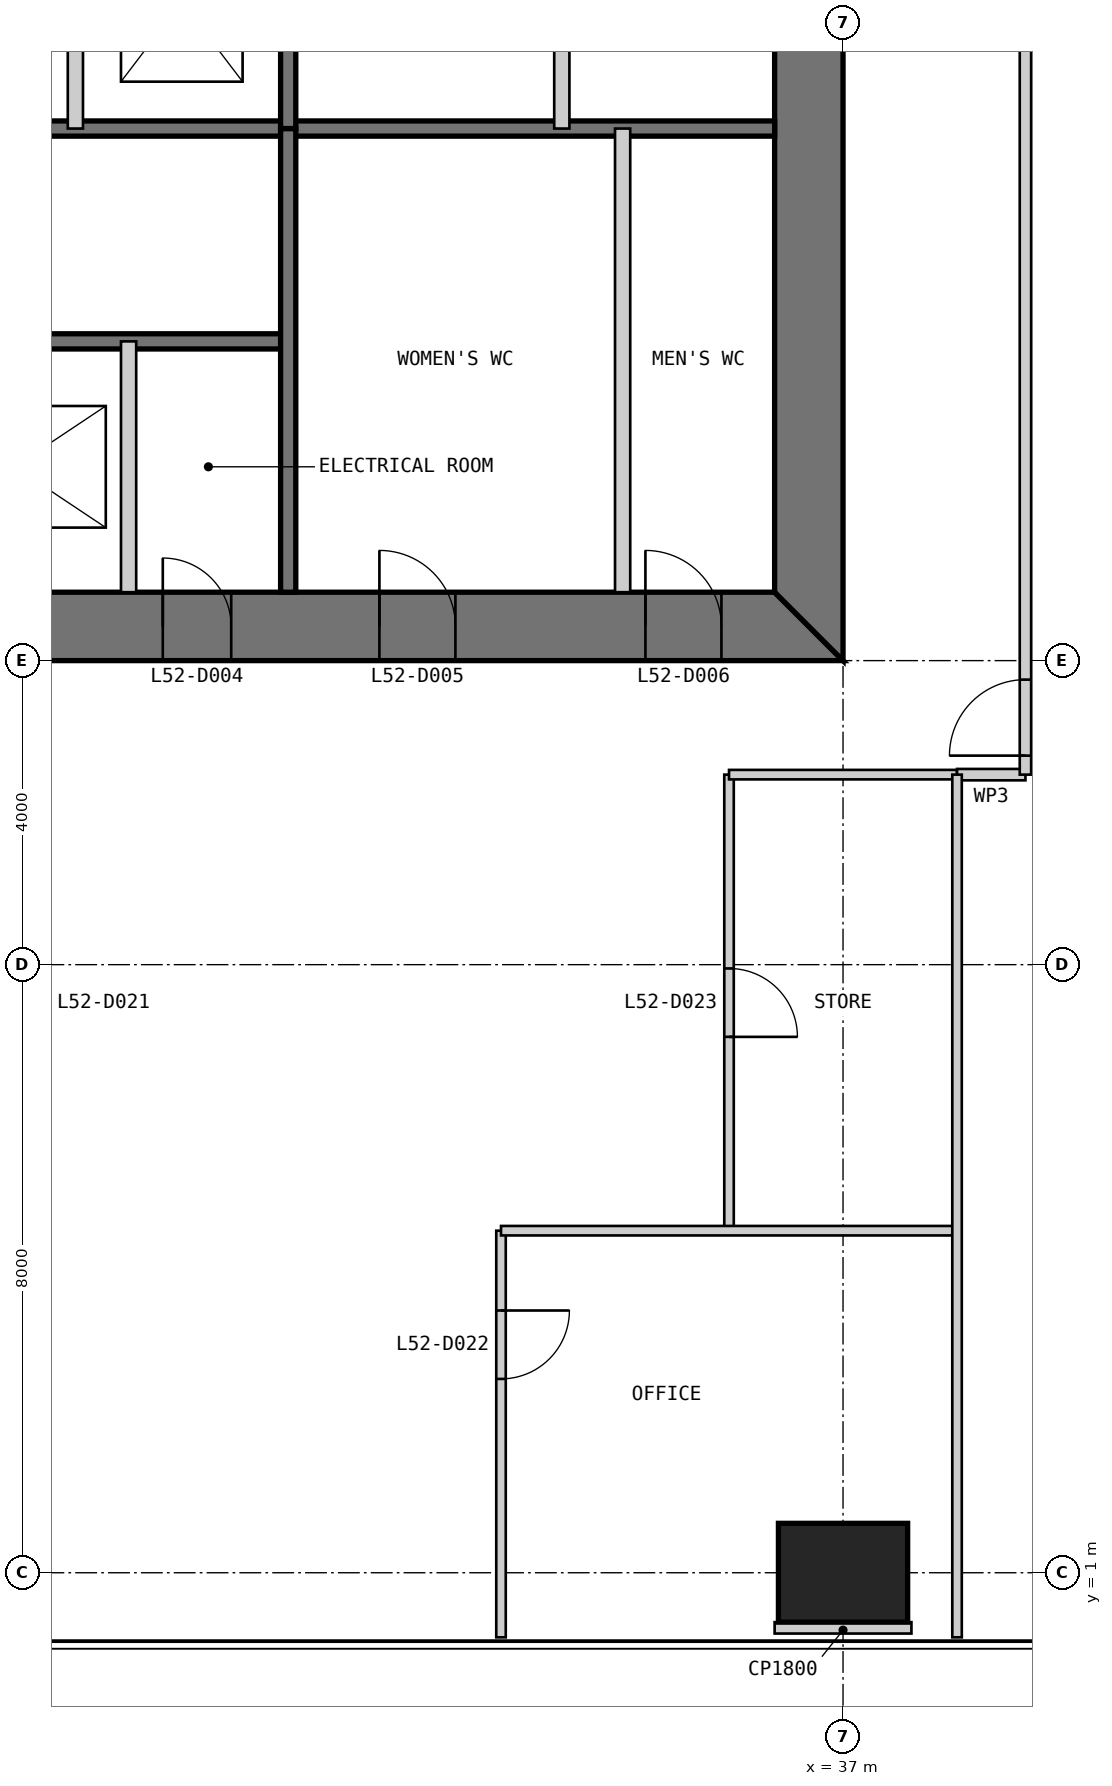
"""IFC4 building model, lengths in metres.
Left out: names, types, materials, properties, quantities, classifications, styles, units other than length and angle.
Written with IfcOpenShell. Run it as: python <this file> out.ifc"""

import sys

from ifc_helpers import new_model, si_unit, direction, frame, frame_2d, origin, origin_2d, place, context, subcontext, project, spatial, polyline, rectangle, outline, extrude, element, fill, save


model = new_model("IFC4")
c1 = context("Model", 3, precision=1e-05, world=origin(), true_north=direction((0.0, 1.0)))
c2 = subcontext(c1, "Body", "Model", "MODEL_VIEW")
j1 = project(units=[si_unit("LENGTHUNIT", "METRE"), si_unit("PLANEANGLEUNIT", "RADIAN")], contexts=[c1])
p1 = place(None, origin())
s1 = spatial("IfcSite", under=j1, at=p1, CompositionType="ELEMENT")
p2 = place(p1, origin())
s2 = spatial("IfcBuilding", under=s1, at=p2, CompositionType="ELEMENT")
p3 = place(p2, frame((0.0, 0.0, 221.8)))
s3 = spatial("IfcBuildingStorey", under=s2, at=p3, CompositionType="ELEMENT", Elevation=221.8)
p4 = place(p3, frame((37.0, 1.0, 0.0), z_axis=(0.0, 0.0, 1.0), x_axis=(1.0, 0.0, 0.0)))
e1 = element("IfcColumn", 1, at=p4, inside=s3, PredefinedType="COLUMN", context=c2, shape_type="SweptSolid", body=[
    extrude(rectangle(XDim=1.7, YDim=1.3, at=origin_2d()), origin(), (0.0, 0.0, 1.0), 4.0),
])
p5 = place(p3, frame((13.0, 13.45, 0.0), z_axis=(0.0, 0.0, 1.0), x_axis=(1.0, 0.0, 0.0)))
e2 = element("IfcWall", 2, at=p5, inside=s3, PredefinedType="SHEAR", context=c2, shape_type="SweptSolid", body=[
    extrude(outline(polyline([(0.0, -0.45), (24.0, -0.45), (23.1, 0.45), (0.9, 0.45), (0.0, -0.45)])), origin(), (0.0, 0.0, 1.0), 4.0),
])
p6 = place(p5, frame((4.9, 0.0, 0.0)))
e3 = element("IfcOpeningElement", 3, at=p6, cuts=e2, PredefinedType="OPENING", context=c2, shape_type="SweptSolid", body=[
    extrude(rectangle(XDim=1.0, YDim=2.2, at=frame_2d((0.5, 1.1))), frame((0.0, 0.46, 0.0), z_axis=(0.0, -1.0, 0.0), x_axis=(1.0, 0.0, 0.0)), (0.0, 0.0, 1.0), 0.92),
])
p7 = place(p5, frame((8.9, 0.0, 0.0)))
e4 = element("IfcOpeningElement", 4, at=p7, cuts=e2, PredefinedType="OPENING", context=c2, shape_type="SweptSolid", body=[
    extrude(rectangle(XDim=1.1, YDim=2.2, at=frame_2d((0.55, 1.1))), frame((0.0, 0.46, 0.0), z_axis=(0.0, -1.0, 0.0), x_axis=(1.0, 0.0, 0.0)), (0.0, 0.0, 1.0), 0.92),
])
p8 = place(p5, frame((15.05, 0.0, 0.0)))
e5 = element("IfcOpeningElement", 5, at=p8, cuts=e2, PredefinedType="OPENING", context=c2, shape_type="SweptSolid", body=[
    extrude(rectangle(XDim=0.9, YDim=2.2, at=frame_2d((0.45, 1.1))), frame((0.0, 0.46, 0.0), z_axis=(0.0, -1.0, 0.0), x_axis=(1.0, 0.0, 0.0)), (0.0, 0.0, 1.0), 0.92),
])
p9 = place(p5, frame((17.9, 0.0, 0.0)))
e6 = element("IfcOpeningElement", 6, at=p9, cuts=e2, PredefinedType="OPENING", context=c2, shape_type="SweptSolid", body=[
    extrude(rectangle(XDim=1.0, YDim=2.2, at=frame_2d((0.5, 1.1))), frame((0.0, 0.46, 0.0), z_axis=(0.0, -1.0, 0.0), x_axis=(1.0, 0.0, 0.0)), (0.0, 0.0, 1.0), 0.92),
])
p10 = place(p5, frame((21.4, 0.0, 0.0)))
e7 = element("IfcOpeningElement", 7, at=p10, cuts=e2, PredefinedType="OPENING", context=c2, shape_type="SweptSolid", body=[
    extrude(rectangle(XDim=1.0, YDim=2.2, at=frame_2d((0.5, 1.1))), frame((0.0, 0.46, 0.0), z_axis=(0.0, -1.0, 0.0), x_axis=(1.0, 0.0, 0.0)), (0.0, 0.0, 1.0), 0.92),
])
p11 = place(p3, frame((36.55, 13.9, 0.0), z_axis=(0.0, 0.0, 1.0), x_axis=(0.0, 1.0, 0.0)))
e8 = element("IfcWall", 8, at=p11, inside=s3, PredefinedType="SHEAR", context=c2, shape_type="SweptSolid", body=[
    extrude(outline(polyline([(-0.9, -0.45), (23.1, -0.45), (22.2, 0.45), (0.0, 0.45), (-0.9, -0.45)])), origin(), (0.0, 0.0, 1.0), 4.0),
])
p12 = place(p11, frame((20.2, 0.0, 0.0)))
e9 = element("IfcOpeningElement", 9, at=p12, cuts=e8, PredefinedType="OPENING", context=c2, shape_type="SweptSolid", body=[
    extrude(rectangle(XDim=1.0, YDim=2.2, at=frame_2d((0.5, 1.1))), frame((0.0, 0.46, 0.0), z_axis=(0.0, -1.0, 0.0), x_axis=(1.0, 0.0, 0.0)), (0.0, 0.0, 1.0), 0.92),
])
p13 = place(p11, frame((17.25, 0.0, 0.0)))
e10 = element("IfcOpeningElement", 10, at=p13, cuts=e8, PredefinedType="OPENING", context=c2, shape_type="SweptSolid", body=[
    extrude(rectangle(XDim=0.9, YDim=2.2, at=frame_2d((0.45, 1.1))), frame((0.0, 0.46, 0.0), z_axis=(0.0, -1.0, 0.0), x_axis=(1.0, 0.0, 0.0)), (0.0, 0.0, 1.0), 0.92),
])
p14 = place(p3, frame((20.3, 17.2, 0.0), z_axis=(0.0, 0.0, 1.0), x_axis=(1.0, 0.0, 0.0)))
e11 = element("IfcWall", 11, at=p14, inside=s3, PredefinedType="SOLIDWALL", context=c2, shape_type="SweptSolid", body=[
    extrude(rectangle(XDim=9.4, YDim=0.2, at=frame_2d((4.7, 0.0))), origin(), (0.0, 0.0, 1.0), 3.8),
])
p15 = place(p14, frame((0.25, 0.0, 0.0)))
e12 = element("IfcOpeningElement", 12, at=p15, cuts=e11, PredefinedType="OPENING", context=c2, shape_type="SweptSolid", body=[
    extrude(rectangle(XDim=1.0, YDim=2.2, at=frame_2d((0.5, 1.1))), frame((0.0, 0.11, 0.0), z_axis=(0.0, -1.0, 0.0), x_axis=(1.0, 0.0, 0.0)), (0.0, 0.0, 1.0), 0.22),
])
p16 = place(p3, frame((20.3, 20.0, 0.0), z_axis=(0.0, 0.0, 1.0), x_axis=(1.0, 0.0, 0.0)))
e13 = element("IfcWall", 13, at=p16, inside=s3, PredefinedType="SOLIDWALL", context=c2, shape_type="SweptSolid", body=[
    extrude(rectangle(XDim=15.8, YDim=0.2, at=frame_2d((7.9, 0.0))), origin(), (0.0, 0.0, 1.0), 3.8),
])
p17 = place(p3, frame((27.6, 13.9, 0.0), z_axis=(0.0, 0.0, 1.0), x_axis=(0.0, 1.0, 0.0)))
e14 = element("IfcWall", 14, at=p17, inside=s3, PredefinedType="PARTITIONING", context=c2, shape_type="SweptSolid", body=[
    extrude(rectangle(XDim=3.3, YDim=0.2, at=frame_2d((1.65, 0.0))), origin(), (0.0, 0.0, 1.0), 3.8),
])
p18 = place(p3, frame((29.7, 13.9, 0.0), z_axis=(0.0, 0.0, 1.0), x_axis=(0.0, 1.0, 0.0)))
e15 = element("IfcWall", 15, at=p18, inside=s3, PredefinedType="SOLIDWALL", context=c2, shape_type="SweptSolid", body=[
    extrude(rectangle(XDim=6.1, YDim=0.2, at=frame_2d((3.05, 0.0))), origin(), (0.0, 0.0, 1.0), 3.8),
])
p19 = place(p3, frame((34.1, 13.9, 0.0), z_axis=(0.0, 0.0, 1.0), x_axis=(0.0, 1.0, 0.0)))
e16 = element("IfcWall", 16, at=p19, inside=s3, PredefinedType="PARTITIONING", context=c2, shape_type="SweptSolid", body=[
    extrude(rectangle(XDim=6.1, YDim=0.2, at=frame_2d((3.05, 0.0))), origin(), (0.0, 0.0, 1.0), 3.8),
])
p20 = place(p3, frame((33.3, 36.1, 0.0), z_axis=(0.0, 0.0, 1.0), x_axis=(0.0, -1.0, 0.0)))
e17 = element("IfcWall", 17, at=p20, inside=s3, PredefinedType="PARTITIONING", context=c2, shape_type="SweptSolid", body=[
    extrude(rectangle(XDim=16.1, YDim=0.2, at=frame_2d((8.05, 0.0))), origin(), (0.0, 0.0, 1.0), 3.8),
])
p21 = place(p3, frame((29.7, 36.1, 0.0), z_axis=(0.0, 0.0, 1.0), x_axis=(0.0, -1.0, 0.0)))
e18 = element("IfcWall", 18, at=p21, inside=s3, PredefinedType="SOLIDWALL", context=c2, shape_type="SweptSolid", body=[
    extrude(rectangle(XDim=16.1, YDim=0.2, at=frame_2d((8.05, 0.0))), origin(), (0.0, 0.0, 1.0), 3.8),
])
p22 = place(p21, frame((7.217, 0.0, 0.0)))
e19 = element("IfcOpeningElement", 19, at=p22, cuts=e18, PredefinedType="OPENING", context=c2, shape_type="SweptSolid", body=[
    extrude(rectangle(XDim=1.1, YDim=2.2, at=frame_2d((0.55, 1.1))), frame((0.0, 0.11, 0.0), z_axis=(0.0, -1.0, 0.0), x_axis=(1.0, 0.0, 0.0)), (0.0, 0.0, 1.0), 0.22),
])
p23 = place(p21, frame((10.55, 0.0, 0.0)))
e20 = element("IfcOpeningElement", 20, at=p23, cuts=e18, PredefinedType="OPENING", context=c2, shape_type="SweptSolid", body=[
    extrude(rectangle(XDim=1.1, YDim=2.2, at=frame_2d((0.55, 1.1))), frame((0.0, 0.11, 0.0), z_axis=(0.0, -1.0, 0.0), x_axis=(1.0, 0.0, 0.0)), (0.0, 0.0, 1.0), 0.22),
])
p24 = place(p21, frame((13.883, 0.0, 0.0)))
e21 = element("IfcOpeningElement", 21, at=p24, cuts=e18, PredefinedType="OPENING", context=c2, shape_type="SweptSolid", body=[
    extrude(rectangle(XDim=1.1, YDim=2.2, at=frame_2d((0.55, 1.1))), frame((0.0, 0.11, 0.0), z_axis=(0.0, -1.0, 0.0), x_axis=(1.0, 0.0, 0.0)), (0.0, 0.0, 1.0), 0.22),
])
p25 = place(p3, frame((26.9, 30.0, 0.0), z_axis=(0.0, 0.0, 1.0), x_axis=(0.0, -1.0, 0.0)))
e22 = element("IfcWall", 22, at=p25, inside=s3, PredefinedType="PARTITIONING", context=c2, shape_type="SweptSolid", body=[
    extrude(rectangle(XDim=10.0, YDim=0.2, at=frame_2d((5.0, 0.0))), origin(), (0.0, 0.0, 1.0), 3.8),
])
p26 = place(p3, frame((32.5, 0.15, 0.0), z_axis=(0.0, 0.0, 1.0), x_axis=(0.0, 1.0, 0.0)))
e23 = element("IfcWall", 23, at=p26, inside=s3, PredefinedType="PARTITIONING", context=c2, shape_type="SweptSolid", body=[
    extrude(rectangle(XDim=5.35, YDim=0.125, at=frame_2d((2.675, 0.0))), origin(), (0.0, 0.0, 1.0), 3.85),
])
p27 = place(p26, frame((3.4, 0.0, 0.0)))
e24 = element("IfcOpeningElement", 24, at=p27, cuts=e23, PredefinedType="OPENING", context=c2, shape_type="SweptSolid", body=[
    extrude(rectangle(XDim=0.9, YDim=2.2, at=frame_2d((0.45, 1.1))), frame((0.0, 0.073, 0.0), z_axis=(0.0, -1.0, 0.0), x_axis=(1.0, 0.0, 0.0)), (0.0, 0.0, 1.0), 0.145),
])
p28 = place(p3, frame((35.5, 5.5, 0.0), z_axis=(0.0, 0.0, 1.0), x_axis=(0.0, 1.0, 0.0)))
e25 = element("IfcWall", 25, at=p28, inside=s3, PredefinedType="PARTITIONING", context=c2, shape_type="SweptSolid", body=[
    extrude(rectangle(XDim=6.0, YDim=0.125, at=frame_2d((3.0, 0.0))), origin(), (0.0, 0.0, 1.0), 3.85),
])
p29 = place(p28, frame((2.55, 0.0, 0.0)))
e26 = element("IfcOpeningElement", 26, at=p29, cuts=e25, PredefinedType="OPENING", context=c2, shape_type="SweptSolid", body=[
    extrude(rectangle(XDim=0.9, YDim=2.2, at=frame_2d((0.45, 1.1))), frame((0.0, 0.073, 0.0), z_axis=(0.0, -1.0, 0.0), x_axis=(1.0, 0.0, 0.0)), (0.0, 0.0, 1.0), 0.145),
])
p30 = place(p3, frame((32.5, 5.5, 0.0), z_axis=(0.0, 0.0, 1.0), x_axis=(1.0, 0.0, 0.0)))
e27 = element("IfcWall", 27, at=p30, inside=s3, PredefinedType="PARTITIONING", context=c2, shape_type="SweptSolid", body=[
    extrude(rectangle(XDim=6.0, YDim=0.125, at=frame_2d((3.0, 0.0))), origin(), (0.0, 0.0, 1.0), 3.85),
])
p31 = place(p3, frame((35.5, 11.5, 0.0), z_axis=(0.0, 0.0, 1.0), x_axis=(1.0, 0.0, 0.0)))
e28 = element("IfcWall", 28, at=p31, inside=s3, PredefinedType="PARTITIONING", context=c2, shape_type="SweptSolid", body=[
    extrude(rectangle(XDim=3.0, YDim=0.125, at=frame_2d((1.5, 0.0))), origin(), (0.0, 0.0, 1.0), 3.85),
])
p32 = place(p3, frame((38.5, 11.5, 0.0), z_axis=(0.0, 0.0, 1.0), x_axis=(1.0, 0.0, 0.0)))
e29 = element("IfcWall", 29, at=p32, inside=s3, PredefinedType="PARTITIONING", context=c2, shape_type="SweptSolid", body=[
    extrude(rectangle(XDim=0.9, YDim=0.15, at=frame_2d((0.45, 0.0))), origin(), (0.0, 0.0, 1.0), 3.85),
])
p33 = place(p3, frame((39.4, 11.5, 0.0), z_axis=(0.0, 0.0, 1.0), x_axis=(0.0, 1.0, 0.0)))
e30 = element("IfcWall", 30, at=p33, inside=s3, PredefinedType="PARTITIONING", context=c2, shape_type="SweptSolid", body=[
    extrude(rectangle(XDim=27.0, YDim=0.15, at=frame_2d((13.5, 0.0))), origin(), (0.0, 0.0, 1.0), 3.85),
])
p34 = place(p33, frame((0.25, 0.0, 0.0)))
e31 = element("IfcOpeningElement", 31, at=p34, cuts=e30, PredefinedType="OPENING", context=c2, shape_type="SweptSolid", body=[
    extrude(rectangle(XDim=1.0, YDim=2.2, at=frame_2d((0.5, 1.1))), frame((0.0, 0.085, 0.0), z_axis=(0.0, -1.0, 0.0), x_axis=(1.0, 0.0, 0.0)), (0.0, 0.0, 1.0), 0.17),
])
p35 = place(p33, frame((22.75, 0.0, 0.0)))
e32 = element("IfcOpeningElement", 32, at=p35, cuts=e30, PredefinedType="OPENING", context=c2, shape_type="SweptSolid", body=[
    extrude(rectangle(XDim=1.0, YDim=2.2, at=frame_2d((0.5, 1.1))), frame((0.0, 0.085, 0.0), z_axis=(0.0, -1.0, 0.0), x_axis=(1.0, 0.0, 0.0)), (0.0, 0.0, 1.0), 0.17),
])
p36 = place(p3, frame((38.5, 0.15, 0.0), z_axis=(0.0, 0.0, 1.0), x_axis=(0.0, 1.0, 0.0)))
e33 = element("IfcWall", 33, at=p36, inside=s3, PredefinedType="PARTITIONING", context=c2, shape_type="SweptSolid", body=[
    extrude(rectangle(XDim=11.35, YDim=0.125, at=frame_2d((5.675, 0.0))), origin(), (0.0, 0.0, 1.0), 3.85),
])
p37 = place(p3, frame((37.0, 0.2, 0.0), z_axis=(0.0, 0.0, 1.0), x_axis=(0.0, 1.0, 0.0)))
e34 = element("IfcWall", 34, at=p37, inside=s3, PredefinedType="PARTITIONING", context=c2, shape_type="SweptSolid", body=[
    extrude(rectangle(XDim=0.15, YDim=1.8, at=frame_2d((0.075, 0.0))), origin(), (0.0, 0.0, 1.0), 3.85),
])
p38 = place(p8, origin())
e35 = element("IfcDoor", 35, at=p38, inside=s3, OperationType="SINGLE_SWING_LEFT", PredefinedType="DOOR", context=c2, shape_type="SweptSolid", body=[
    extrude(rectangle(XDim=0.9, YDim=2.2, at=frame_2d((0.45, 1.1))), frame((0.0, 0.025, 0.0), z_axis=(0.0, -1.0, 0.0), x_axis=(1.0, 0.0, 0.0)), (0.0, 0.0, 1.0), 0.05),
    extrude(outline(polyline([(0.0, 0.0), (0.04, 0.0), (0.04, 2.16), (0.86, 2.16), (0.86, 0.0), (0.9, 0.0), (0.9, 2.2), (0.0, 2.2), (0.0, 0.0)])), frame((0.0, 0.3, 0.0), z_axis=(0.0, -1.0, 0.0), x_axis=(1.0, 0.0, 0.0)), (0.0, 0.0, 1.0), 0.6),
])
fill(e5, e35)
p39 = place(p9, origin())
e36 = element("IfcDoor", 36, at=p39, inside=s3, OperationType="SINGLE_SWING_LEFT", PredefinedType="DOOR", context=c2, shape_type="SweptSolid", body=[
    extrude(rectangle(XDim=1.0, YDim=2.2, at=frame_2d((0.5, 1.1))), frame((0.0, 0.025, 0.0), z_axis=(0.0, -1.0, 0.0), x_axis=(1.0, 0.0, 0.0)), (0.0, 0.0, 1.0), 0.05),
    extrude(outline(polyline([(0.0, 0.0), (0.04, 0.0), (0.04, 2.16), (0.96, 2.16), (0.96, 0.0), (1.0, 0.0), (1.0, 2.2), (0.0, 2.2), (0.0, 0.0)])), frame((0.0, 0.3, 0.0), z_axis=(0.0, -1.0, 0.0), x_axis=(1.0, 0.0, 0.0)), (0.0, 0.0, 1.0), 0.6),
])
fill(e6, e36)
p40 = place(p10, origin())
e37 = element("IfcDoor", 37, at=p40, inside=s3, OperationType="SINGLE_SWING_LEFT", PredefinedType="DOOR", context=c2, shape_type="SweptSolid", body=[
    extrude(rectangle(XDim=1.0, YDim=2.2, at=frame_2d((0.5, 1.1))), frame((0.0, 0.025, 0.0), z_axis=(0.0, -1.0, 0.0), x_axis=(1.0, 0.0, 0.0)), (0.0, 0.0, 1.0), 0.05),
    extrude(outline(polyline([(0.0, 0.0), (0.04, 0.0), (0.04, 2.16), (0.96, 2.16), (0.96, 0.0), (1.0, 0.0), (1.0, 2.2), (0.0, 2.2), (0.0, 0.0)])), frame((0.0, 0.3, 0.0), z_axis=(0.0, -1.0, 0.0), x_axis=(1.0, 0.0, 0.0)), (0.0, 0.0, 1.0), 0.6),
])
fill(e7, e37)
p41 = place(p27, frame((0.9, 0.0, 0.0), z_axis=(0.0, 0.0, 1.0), x_axis=(-1.0, 0.0, 0.0)))
e38 = element("IfcDoor", 38, at=p41, inside=s3, OperationType="SINGLE_SWING_LEFT", PredefinedType="DOOR", context=c2, shape_type="SweptSolid", body=[
    extrude(rectangle(XDim=0.9, YDim=2.2, at=frame_2d((0.45, 1.1))), frame((0.0, 0.025, 0.0), z_axis=(0.0, -1.0, 0.0), x_axis=(1.0, 0.0, 0.0)), (0.0, 0.0, 1.0), 0.05),
])
fill(e24, e38)
p42 = place(p29, frame((0.9, 0.0, 0.0), z_axis=(0.0, 0.0, 1.0), x_axis=(-1.0, 0.0, 0.0)))
e39 = element("IfcDoor", 39, at=p42, inside=s3, OperationType="SINGLE_SWING_RIGHT", PredefinedType="DOOR", context=c2, shape_type="SweptSolid", body=[
    extrude(rectangle(XDim=0.9, YDim=2.2, at=frame_2d((0.45, 1.1))), frame((0.0, 0.025, 0.0), z_axis=(0.0, -1.0, 0.0), x_axis=(1.0, 0.0, 0.0)), (0.0, 0.0, 1.0), 0.05),
])
fill(e26, e39)
p43 = place(p34, origin())
e40 = element("IfcDoor", 40, at=p43, inside=s3, OperationType="SINGLE_SWING_LEFT", PredefinedType="DOOR", context=c2, shape_type="SweptSolid", body=[
    extrude(rectangle(XDim=1.0, YDim=2.2, at=frame_2d((0.5, 1.1))), frame((0.0, 0.025, 0.0), z_axis=(0.0, -1.0, 0.0), x_axis=(1.0, 0.0, 0.0)), (0.0, 0.0, 1.0), 0.05),
])
fill(e31, e40)
save(model, sys.argv[1])
